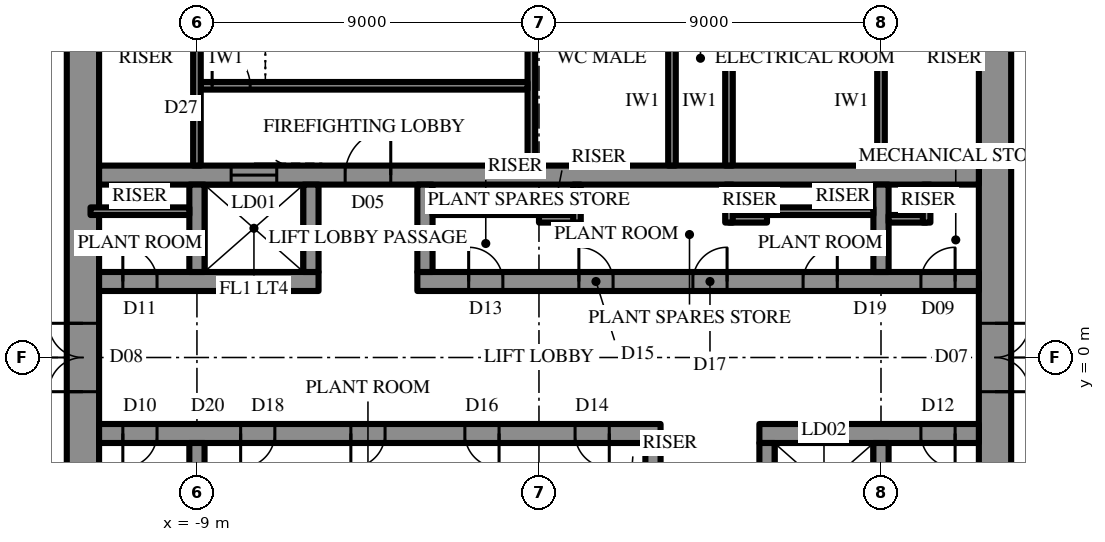
"""IFC4 building model, lengths in metres.
Left out: names, types, materials, properties, quantities, classifications, styles, units other than length and angle.
Written with IfcOpenShell. Run it as: python <this file> out.ifc"""

import sys

from ifc_helpers import new_model, si_unit, direction, frame, frame_2d, origin, place, context, subcontext, project, spatial, rectangle, extrude, element, fill, save


model = new_model("IFC4")
c1 = context("Model", 3, precision=1e-05, world=origin(), true_north=direction((0.0, 1.0)))
c2 = subcontext(c1, "Body", "Model", "MODEL_VIEW")
j1 = project(units=[si_unit("LENGTHUNIT", "METRE"), si_unit("PLANEANGLEUNIT", "RADIAN")], contexts=[c1])
p1 = place(None, origin())
s1 = spatial("IfcSite", under=j1, at=p1, CompositionType="ELEMENT")
p2 = place(p1, origin())
s2 = spatial("IfcBuilding", under=s1, at=p2, CompositionType="ELEMENT")
p3 = place(p2, frame((0.0, 0.0, 402.3)))
s3 = spatial("IfcBuildingStorey", under=s2, at=p3, CompositionType="ELEMENT", Elevation=402.3)
p4 = place(p3, frame((12.0, -10.7, 0.0), z_axis=(0.0, 0.0, 1.0), x_axis=(0.0, 1.0, 0.0)))
e1 = element("IfcWall", 1, at=p4, inside=s3, PredefinedType="SHEAR", context=c2, shape_type="SweptSolid", body=[
    extrude(rectangle(XDim=21.4, YDim=0.85, at=frame_2d((10.7, 0.0))), origin(), (0.0, 0.0, 1.0), 6.0),
])
p5 = place(p4, frame((9.8, 0.0, 0.0)))
e2 = element("IfcOpeningElement", 2, at=p5, cuts=e1, PredefinedType="OPENING", context=c2, shape_type="SweptSolid", body=[
    extrude(rectangle(XDim=1.8, YDim=2.4, at=frame_2d((0.9, 1.2))), frame((0.0, 0.435, 0.0), z_axis=(0.0, -1.0, 0.0), x_axis=(1.0, 0.0, 0.0)), (0.0, 0.0, 1.0), 0.87),
])
p6 = place(p3, frame((-12.0, 10.7, 0.0), z_axis=(0.0, 0.0, 1.0), x_axis=(0.0, -1.0, 0.0)))
e3 = element("IfcWall", 3, at=p6, inside=s3, PredefinedType="SHEAR", context=c2, shape_type="SweptSolid", body=[
    extrude(rectangle(XDim=21.4, YDim=0.85, at=frame_2d((10.7, 0.0))), origin(), (0.0, 0.0, 1.0), 6.0),
])
p7 = place(p6, frame((9.8, 0.0, 0.0)))
e4 = element("IfcOpeningElement", 4, at=p7, cuts=e3, PredefinedType="OPENING", context=c2, shape_type="SweptSolid", body=[
    extrude(rectangle(XDim=1.8, YDim=2.4, at=frame_2d((0.9, 1.2))), frame((0.0, 0.435, 0.0), z_axis=(0.0, -1.0, 0.0), x_axis=(1.0, 0.0, 0.0)), (0.0, 0.0, 1.0), 0.87),
])
p8 = place(p3, frame((-11.575, 2.0, 0.0), z_axis=(0.0, 0.0, 1.0), x_axis=(1.0, 0.0, 0.0)))
e5 = element("IfcWall", 5, at=p8, inside=s3, PredefinedType="SHEAR", context=c2, shape_type="SweptSolid", body=[
    extrude(rectangle(XDim=5.775, YDim=0.5, at=frame_2d((2.887, 0.0))), origin(), (0.0, 0.0, 1.0), 6.0),
])
p9 = place(p8, frame((0.625, 0.0, 0.0)))
e6 = element("IfcOpeningElement", 6, at=p9, cuts=e5, PredefinedType="OPENING", context=c2, shape_type="SweptSolid", body=[
    extrude(rectangle(XDim=0.9, YDim=2.2, at=frame_2d((0.45, 1.1))), frame((0.0, 0.26, 0.0), z_axis=(0.0, -1.0, 0.0), x_axis=(1.0, 0.0, 0.0)), (0.0, 0.0, 1.0), 0.52),
])
p10 = place(p3, frame((-3.2, 2.0, 0.0), z_axis=(0.0, 0.0, 1.0), x_axis=(1.0, 0.0, 0.0)))
e7 = element("IfcWall", 7, at=p10, inside=s3, PredefinedType="SHEAR", context=c2, shape_type="SweptSolid", body=[
    extrude(rectangle(XDim=14.775, YDim=0.5, at=frame_2d((7.387, 0.0))), origin(), (0.0, 0.0, 1.0), 6.0),
])
p11 = place(p10, frame((1.35, 0.0, 0.0)))
e8 = element("IfcOpeningElement", 8, at=p11, cuts=e7, PredefinedType="OPENING", context=c2, shape_type="SweptSolid", body=[
    extrude(rectangle(XDim=0.9, YDim=2.2, at=frame_2d((0.45, 1.1))), frame((0.0, 0.26, 0.0), z_axis=(0.0, -1.0, 0.0), x_axis=(1.0, 0.0, 0.0)), (0.0, 0.0, 1.0), 0.52),
])
p12 = place(p10, frame((4.25, 0.0, 0.0)))
e9 = element("IfcOpeningElement", 9, at=p12, cuts=e7, PredefinedType="OPENING", context=c2, shape_type="SweptSolid", body=[
    extrude(rectangle(XDim=0.9, YDim=2.2, at=frame_2d((0.45, 1.1))), frame((0.0, 0.26, 0.0), z_axis=(0.0, -1.0, 0.0), x_axis=(1.0, 0.0, 0.0)), (0.0, 0.0, 1.0), 0.52),
])
p13 = place(p10, frame((7.25, 0.0, 0.0)))
e10 = element("IfcOpeningElement", 10, at=p13, cuts=e7, PredefinedType="OPENING", context=c2, shape_type="SweptSolid", body=[
    extrude(rectangle(XDim=0.9, YDim=2.2, at=frame_2d((0.45, 1.1))), frame((0.0, 0.26, 0.0), z_axis=(0.0, -1.0, 0.0), x_axis=(1.0, 0.0, 0.0)), (0.0, 0.0, 1.0), 0.52),
])
p14 = place(p10, frame((10.15, 0.0, 0.0)))
e11 = element("IfcOpeningElement", 11, at=p14, cuts=e7, PredefinedType="OPENING", context=c2, shape_type="SweptSolid", body=[
    extrude(rectangle(XDim=0.9, YDim=2.2, at=frame_2d((0.45, 1.1))), frame((0.0, 0.26, 0.0), z_axis=(0.0, -1.0, 0.0), x_axis=(1.0, 0.0, 0.0)), (0.0, 0.0, 1.0), 0.52),
])
p15 = place(p10, frame((13.25, 0.0, 0.0)))
e12 = element("IfcOpeningElement", 12, at=p15, cuts=e7, PredefinedType="OPENING", context=c2, shape_type="SweptSolid", body=[
    extrude(rectangle(XDim=0.9, YDim=2.2, at=frame_2d((0.45, 1.1))), frame((0.0, 0.26, 0.0), z_axis=(0.0, -1.0, 0.0), x_axis=(1.0, 0.0, 0.0)), (0.0, 0.0, 1.0), 0.52),
])
p16 = place(p3, frame((-11.575, 4.8, 0.0), z_axis=(0.0, 0.0, 1.0), x_axis=(1.0, 0.0, 0.0)))
e13 = element("IfcWall", 13, at=p16, inside=s3, PredefinedType="SHEAR", context=c2, shape_type="SweptSolid", body=[
    extrude(rectangle(XDim=23.15, YDim=0.5, at=frame_2d((11.575, 0.0))), origin(), (0.0, 0.0, 1.0), 6.0),
])
p17 = place(p16, frame((6.475, 0.0, 0.0)))
e14 = element("IfcOpeningElement", 14, at=p17, cuts=e13, PredefinedType="OPENING", context=c2, shape_type="SweptSolid", body=[
    extrude(rectangle(XDim=1.2, YDim=2.2, at=frame_2d((0.6, 1.1))), frame((0.0, 0.26, 0.0), z_axis=(0.0, -1.0, 0.0), x_axis=(1.0, 0.0, 0.0)), (0.0, 0.0, 1.0), 0.52),
])
p18 = place(p16, frame((3.475, 0.0, 0.0)))
e15 = element("IfcOpeningElement", 15, at=p18, cuts=e13, PredefinedType="OPENING", context=c2, shape_type="SweptSolid", body=[
    extrude(rectangle(XDim=1.2, YDim=2.2, at=frame_2d((0.6, 1.1))), frame((0.0, 0.26, 0.0), z_axis=(0.0, -1.0, 0.0), x_axis=(1.0, 0.0, 0.0)), (0.0, 0.0, 1.0), 0.52),
])
for number, where, z_axis, x_axis in (
    (16, (-9.0, 2.25, 0.0), (0.0, 0.0, 1.0), (0.0, 1.0, 0.0)),
    (17, (-6.0, 2.25, 0.0), (0.0, 0.0, 1.0), (0.0, 1.0, 0.0)),
    (18, (-3.0, 2.25, 0.0), (0.0, 0.0, 1.0), (0.0, 1.0, 0.0)),
    (19, (9.0, 2.25, 0.0), (0.0, 0.0, 1.0), (0.0, 1.0, 0.0)),
):
    element("IfcWall", number, at=place(p3, frame(where, z_axis=z_axis, x_axis=x_axis)), inside=s3, PredefinedType="SHEAR", context=c2, shape_type="SweptSolid", body=[
        extrude(rectangle(XDim=2.3, YDim=0.4, at=frame_2d((1.15, 0.0))), origin(), (0.0, 0.0, 1.0), 6.0),
    ])
p19 = place(p3, frame((-0.2, 5.05, 0.0), z_axis=(0.0, 0.0, 1.0), x_axis=(0.0, 1.0, 0.0)))
e20 = element("IfcWall", 20, at=p19, inside=s3, PredefinedType="SHEAR", context=c2, shape_type="SweptSolid", body=[
    extrude(rectangle(XDim=5.65, YDim=0.2, at=frame_2d((2.825, 0.0))), origin(), (0.0, 0.0, 1.0), 6.0),
])
p20 = place(p3, frame((-8.9, 7.15, 0.0), z_axis=(0.0, 0.0, 1.0), x_axis=(1.0, 0.0, 0.0)))
e21 = element("IfcWall", 21, at=p20, inside=s3, PredefinedType="SHEAR", context=c2, shape_type="SweptSolid", body=[
    extrude(rectangle(XDim=8.6, YDim=0.2, at=frame_2d((4.3, 0.0))), origin(), (0.0, 0.0, 1.0), 6.0),
])
p21 = place(p20, frame((0.3, 0.0, 0.0)))
e22 = element("IfcOpeningElement", 22, at=p21, cuts=e21, PredefinedType="OPENING", context=c2, shape_type="SweptSolid", body=[
    extrude(rectangle(XDim=1.0, YDim=2.2, at=frame_2d((0.5, 1.1))), frame((0.0, 0.11, 0.0), z_axis=(0.0, -1.0, 0.0), x_axis=(1.0, 0.0, 0.0)), (0.0, 0.0, 1.0), 0.22),
])
p22 = place(p3, frame((11.575, -2.0, 0.0), z_axis=(0.0, 0.0, 1.0), x_axis=(-1.0, 0.0, 0.0)))
e23 = element("IfcWall", 23, at=p22, inside=s3, PredefinedType="SHEAR", context=c2, shape_type="SweptSolid", body=[
    extrude(rectangle(XDim=5.775, YDim=0.5, at=frame_2d((2.887, 0.0))), origin(), (0.0, 0.0, 1.0), 6.0),
])
p23 = place(p22, frame((0.625, 0.0, 0.0)))
e24 = element("IfcOpeningElement", 24, at=p23, cuts=e23, PredefinedType="OPENING", context=c2, shape_type="SweptSolid", body=[
    extrude(rectangle(XDim=0.9, YDim=2.2, at=frame_2d((0.45, 1.1))), frame((0.0, 0.26, 0.0), z_axis=(0.0, -1.0, 0.0), x_axis=(1.0, 0.0, 0.0)), (0.0, 0.0, 1.0), 0.52),
])
p24 = place(p3, frame((3.2, -2.0, 0.0), z_axis=(0.0, 0.0, 1.0), x_axis=(-1.0, 0.0, 0.0)))
e25 = element("IfcWall", 25, at=p24, inside=s3, PredefinedType="SHEAR", context=c2, shape_type="SweptSolid", body=[
    extrude(rectangle(XDim=14.775, YDim=0.5, at=frame_2d((7.387, 0.0))), origin(), (0.0, 0.0, 1.0), 6.0),
])
p25 = place(p24, frame((1.35, 0.0, 0.0)))
e26 = element("IfcOpeningElement", 26, at=p25, cuts=e25, PredefinedType="OPENING", context=c2, shape_type="SweptSolid", body=[
    extrude(rectangle(XDim=0.9, YDim=2.2, at=frame_2d((0.45, 1.1))), frame((0.0, 0.26, 0.0), z_axis=(0.0, -1.0, 0.0), x_axis=(1.0, 0.0, 0.0)), (0.0, 0.0, 1.0), 0.52),
])
p26 = place(p24, frame((4.25, 0.0, 0.0)))
e27 = element("IfcOpeningElement", 27, at=p26, cuts=e25, PredefinedType="OPENING", context=c2, shape_type="SweptSolid", body=[
    extrude(rectangle(XDim=0.9, YDim=2.2, at=frame_2d((0.45, 1.1))), frame((0.0, 0.26, 0.0), z_axis=(0.0, -1.0, 0.0), x_axis=(1.0, 0.0, 0.0)), (0.0, 0.0, 1.0), 0.52),
])
p27 = place(p24, frame((7.25, 0.0, 0.0)))
e28 = element("IfcOpeningElement", 28, at=p27, cuts=e25, PredefinedType="OPENING", context=c2, shape_type="SweptSolid", body=[
    extrude(rectangle(XDim=0.9, YDim=2.2, at=frame_2d((0.45, 1.1))), frame((0.0, 0.26, 0.0), z_axis=(0.0, -1.0, 0.0), x_axis=(1.0, 0.0, 0.0)), (0.0, 0.0, 1.0), 0.52),
])
p28 = place(p24, frame((10.15, 0.0, 0.0)))
e29 = element("IfcOpeningElement", 29, at=p28, cuts=e25, PredefinedType="OPENING", context=c2, shape_type="SweptSolid", body=[
    extrude(rectangle(XDim=0.9, YDim=2.2, at=frame_2d((0.45, 1.1))), frame((0.0, 0.26, 0.0), z_axis=(0.0, -1.0, 0.0), x_axis=(1.0, 0.0, 0.0)), (0.0, 0.0, 1.0), 0.52),
])
p29 = place(p24, frame((13.25, 0.0, 0.0)))
e30 = element("IfcOpeningElement", 30, at=p29, cuts=e25, PredefinedType="OPENING", context=c2, shape_type="SweptSolid", body=[
    extrude(rectangle(XDim=0.9, YDim=2.2, at=frame_2d((0.45, 1.1))), frame((0.0, 0.26, 0.0), z_axis=(0.0, -1.0, 0.0), x_axis=(1.0, 0.0, 0.0)), (0.0, 0.0, 1.0), 0.52),
])
for number, where, z_axis, x_axis in (
    (31, (9.0, -2.25, 0.0), (0.0, 0.0, 1.0), (0.0, -1.0, 0.0)),
    (32, (6.0, -2.25, 0.0), (0.0, 0.0, 1.0), (0.0, -1.0, 0.0)),
    (33, (3.0, -2.25, 0.0), (0.0, 0.0, 1.0), (0.0, -1.0, 0.0)),
    (34, (-9.0, -2.25, 0.0), (0.0, 0.0, 1.0), (0.0, -1.0, 0.0)),
):
    element("IfcWall", number, at=place(p3, frame(where, z_axis=z_axis, x_axis=x_axis)), inside=s3, PredefinedType="SHEAR", context=c2, shape_type="SweptSolid", body=[
        extrude(rectangle(XDim=2.3, YDim=0.4, at=frame_2d((1.15, 0.0))), origin(), (0.0, 0.0, 1.0), 6.0),
    ])
for number, where, z_axis, x_axis in (
    (35, (-9.0, 5.05, 0.0), (0.0, 0.0, 1.0), (0.0, 1.0, 0.0)),
    (36, (9.0, 5.05, 0.0), (0.0, 0.0, 1.0), (0.0, 1.0, 0.0)),
    (37, (3.5, 5.05, 0.0), (0.0, 0.0, 1.0), (0.0, 1.0, 0.0)),
    (38, (5.0, 5.05, 0.0), (0.0, 0.0, 1.0), (0.0, 1.0, 0.0)),
):
    element("IfcWall", number, at=place(p3, frame(where, z_axis=z_axis, x_axis=x_axis)), inside=s3, PredefinedType="PARTITIONING", context=c2, shape_type="SweptSolid", body=[
        extrude(rectangle(XDim=5.65, YDim=0.2, at=frame_2d((2.825, 0.0))), origin(), (0.0, 0.0, 1.0), 5.7),
    ])
p30 = place(p3, frame((-11.8, 3.85, 0.0), z_axis=(0.0, 0.0, 1.0), x_axis=(1.0, 0.0, 0.0)))
e39 = element("IfcWall", 39, at=p30, inside=s3, PredefinedType="PARTITIONING", context=c2, shape_type="SweptSolid", body=[
    extrude(rectangle(XDim=2.6, YDim=0.2, at=frame_2d((1.3, 0.0))), origin(), (0.0, 0.0, 1.0), 5.7),
])
p31 = place(p3, frame((-2.8, 3.85, 0.0), z_axis=(0.0, 0.0, 1.0), x_axis=(1.0, 0.0, 0.0)))
e40 = element("IfcWall", 40, at=p31, inside=s3, PredefinedType="PARTITIONING", context=c2, shape_type="SweptSolid", body=[
    extrude(rectangle(XDim=2.8, YDim=0.2, at=frame_2d((1.4, 0.0))), origin(), (0.0, 0.0, 1.0), 5.7),
])
for number, where, z_axis, x_axis in (
    (41, (0.0, 3.65, 0.0), (0.0, 0.0, 1.0), (1.0, 0.0, 0.0)),
    (42, (1.0, 3.55, 0.0), (0.0, 0.0, 1.0), (0.0, 1.0, 0.0)),
    (43, (5.0, 3.65, 0.0), (0.0, 0.0, 1.0), (1.0, 0.0, 0.0)),
    (44, (5.0, 3.55, 0.0), (0.0, 0.0, 1.0), (0.0, 1.0, 0.0)),
):
    element("IfcWall", number, at=place(p3, frame(where, z_axis=z_axis, x_axis=x_axis)), inside=s3, PredefinedType="PARTITIONING", context=c2, shape_type="SweptSolid", body=[
        extrude(rectangle(XDim=1.0, YDim=0.2, at=frame_2d((0.5, 0.0))), origin(), (0.0, 0.0, 1.0), 5.7),
    ])
p32 = place(p3, frame((6.0, 3.85, 0.0), z_axis=(0.0, 0.0, 1.0), x_axis=(1.0, 0.0, 0.0)))
e45 = element("IfcWall", 45, at=p32, inside=s3, PredefinedType="PARTITIONING", context=c2, shape_type="SweptSolid", body=[
    extrude(rectangle(XDim=2.8, YDim=0.2, at=frame_2d((1.4, 0.0))), origin(), (0.0, 0.0, 1.0), 5.7),
])
for number, where, z_axis, x_axis in (
    (46, (9.2, 3.65, 0.0), (0.0, 0.0, 1.0), (1.0, 0.0, 0.0)),
    (47, (10.2, 3.55, 0.0), (0.0, 0.0, 1.0), (0.0, 1.0, 0.0)),
):
    element("IfcWall", number, at=place(p3, frame(where, z_axis=z_axis, x_axis=x_axis)), inside=s3, PredefinedType="PARTITIONING", context=c2, shape_type="SweptSolid", body=[
        extrude(rectangle(XDim=1.0, YDim=0.2, at=frame_2d((0.5, 0.0))), origin(), (0.0, 0.0, 1.0), 5.7),
    ])
p33 = place(p5, frame((1.8, 0.0, 0.0), z_axis=(0.0, 0.0, 1.0), x_axis=(-1.0, 0.0, 0.0)))
e48 = element("IfcDoor", 48, at=p33, inside=s3, OperationType="DOUBLE_DOOR_SINGLE_SWING", PredefinedType="DOOR", context=c2, shape_type="SweptSolid", body=[
    extrude(rectangle(XDim=1.8, YDim=2.4, at=frame_2d((0.9, 1.2))), frame((0.0, 0.025, 0.0), z_axis=(0.0, -1.0, 0.0), x_axis=(1.0, 0.0, 0.0)), (0.0, 0.0, 1.0), 0.05),
])
fill(e2, e48)
p34 = place(p7, frame((1.8, 0.0, 0.0), z_axis=(0.0, 0.0, 1.0), x_axis=(-1.0, 0.0, 0.0)))
e49 = element("IfcDoor", 49, at=p34, inside=s3, OperationType="DOUBLE_DOOR_SINGLE_SWING", PredefinedType="DOOR", context=c2, shape_type="SweptSolid", body=[
    extrude(rectangle(XDim=1.8, YDim=2.4, at=frame_2d((0.9, 1.2))), frame((0.0, 0.025, 0.0), z_axis=(0.0, -1.0, 0.0), x_axis=(1.0, 0.0, 0.0)), (0.0, 0.0, 1.0), 0.05),
])
fill(e4, e49)
p35 = place(p17, origin())
e50 = element("IfcDoor", 50, at=p35, inside=s3, OperationType="SINGLE_SWING_LEFT", PredefinedType="DOOR", context=c2, shape_type="SweptSolid", body=[
    extrude(rectangle(XDim=1.2, YDim=2.2, at=frame_2d((0.6, 1.1))), frame((0.0, 0.025, 0.0), z_axis=(0.0, -1.0, 0.0), x_axis=(1.0, 0.0, 0.0)), (0.0, 0.0, 1.0), 0.05),
])
fill(e14, e50)
p36 = place(p21, origin())
e51 = element("IfcDoor", 51, at=p36, inside=s3, OperationType="SINGLE_SWING_RIGHT", PredefinedType="DOOR", context=c2, shape_type="SweptSolid", body=[
    extrude(rectangle(XDim=1.0, YDim=2.2, at=frame_2d((0.5, 1.1))), frame((0.0, 0.025, 0.0), z_axis=(0.0, -1.0, 0.0), x_axis=(1.0, 0.0, 0.0)), (0.0, 0.0, 1.0), 0.05),
])
fill(e22, e51)
p37 = place(p9, origin())
e52 = element("IfcDoor", 52, at=p37, inside=s3, OperationType="SINGLE_SWING_RIGHT", PredefinedType="DOOR", context=c2, shape_type="SweptSolid", body=[
    extrude(rectangle(XDim=0.9, YDim=2.2, at=frame_2d((0.45, 1.1))), frame((0.0, 0.025, 0.0), z_axis=(0.0, -1.0, 0.0), x_axis=(1.0, 0.0, 0.0)), (0.0, 0.0, 1.0), 0.05),
])
fill(e6, e52)
p38 = place(p11, origin())
e53 = element("IfcDoor", 53, at=p38, inside=s3, OperationType="SINGLE_SWING_RIGHT", PredefinedType="DOOR", context=c2, shape_type="SweptSolid", body=[
    extrude(rectangle(XDim=0.9, YDim=2.2, at=frame_2d((0.45, 1.1))), frame((0.0, 0.025, 0.0), z_axis=(0.0, -1.0, 0.0), x_axis=(1.0, 0.0, 0.0)), (0.0, 0.0, 1.0), 0.05),
])
fill(e8, e53)
p39 = place(p12, origin())
e54 = element("IfcDoor", 54, at=p39, inside=s3, OperationType="SINGLE_SWING_RIGHT", PredefinedType="DOOR", context=c2, shape_type="SweptSolid", body=[
    extrude(rectangle(XDim=0.9, YDim=2.2, at=frame_2d((0.45, 1.1))), frame((0.0, 0.025, 0.0), z_axis=(0.0, -1.0, 0.0), x_axis=(1.0, 0.0, 0.0)), (0.0, 0.0, 1.0), 0.05),
])
fill(e9, e54)
p40 = place(p13, origin())
e55 = element("IfcDoor", 55, at=p40, inside=s3, OperationType="SINGLE_SWING_LEFT", PredefinedType="DOOR", context=c2, shape_type="SweptSolid", body=[
    extrude(rectangle(XDim=0.9, YDim=2.2, at=frame_2d((0.45, 1.1))), frame((0.0, 0.025, 0.0), z_axis=(0.0, -1.0, 0.0), x_axis=(1.0, 0.0, 0.0)), (0.0, 0.0, 1.0), 0.05),
])
fill(e10, e55)
p41 = place(p14, origin())
e56 = element("IfcDoor", 56, at=p41, inside=s3, OperationType="SINGLE_SWING_LEFT", PredefinedType="DOOR", context=c2, shape_type="SweptSolid", body=[
    extrude(rectangle(XDim=0.9, YDim=2.2, at=frame_2d((0.45, 1.1))), frame((0.0, 0.025, 0.0), z_axis=(0.0, -1.0, 0.0), x_axis=(1.0, 0.0, 0.0)), (0.0, 0.0, 1.0), 0.05),
])
fill(e11, e56)
p42 = place(p15, origin())
e57 = element("IfcDoor", 57, at=p42, inside=s3, OperationType="SINGLE_SWING_LEFT", PredefinedType="DOOR", context=c2, shape_type="SweptSolid", body=[
    extrude(rectangle(XDim=0.9, YDim=2.2, at=frame_2d((0.45, 1.1))), frame((0.0, 0.025, 0.0), z_axis=(0.0, -1.0, 0.0), x_axis=(1.0, 0.0, 0.0)), (0.0, 0.0, 1.0), 0.05),
])
fill(e12, e57)
p43 = place(p23, origin())
e58 = element("IfcDoor", 58, at=p43, inside=s3, OperationType="SINGLE_SWING_RIGHT", PredefinedType="DOOR", context=c2, shape_type="SweptSolid", body=[
    extrude(rectangle(XDim=0.9, YDim=2.2, at=frame_2d((0.45, 1.1))), frame((0.0, 0.025, 0.0), z_axis=(0.0, -1.0, 0.0), x_axis=(1.0, 0.0, 0.0)), (0.0, 0.0, 1.0), 0.05),
])
fill(e24, e58)
p44 = place(p25, origin())
e59 = element("IfcDoor", 59, at=p44, inside=s3, OperationType="SINGLE_SWING_RIGHT", PredefinedType="DOOR", context=c2, shape_type="SweptSolid", body=[
    extrude(rectangle(XDim=0.9, YDim=2.2, at=frame_2d((0.45, 1.1))), frame((0.0, 0.025, 0.0), z_axis=(0.0, -1.0, 0.0), x_axis=(1.0, 0.0, 0.0)), (0.0, 0.0, 1.0), 0.05),
])
fill(e26, e59)
p45 = place(p26, origin())
e60 = element("IfcDoor", 60, at=p45, inside=s3, OperationType="SINGLE_SWING_RIGHT", PredefinedType="DOOR", context=c2, shape_type="SweptSolid", body=[
    extrude(rectangle(XDim=0.9, YDim=2.2, at=frame_2d((0.45, 1.1))), frame((0.0, 0.025, 0.0), z_axis=(0.0, -1.0, 0.0), x_axis=(1.0, 0.0, 0.0)), (0.0, 0.0, 1.0), 0.05),
])
fill(e27, e60)
p46 = place(p27, origin())
e61 = element("IfcDoor", 61, at=p46, inside=s3, OperationType="SINGLE_SWING_LEFT", PredefinedType="DOOR", context=c2, shape_type="SweptSolid", body=[
    extrude(rectangle(XDim=0.9, YDim=2.2, at=frame_2d((0.45, 1.1))), frame((0.0, 0.025, 0.0), z_axis=(0.0, -1.0, 0.0), x_axis=(1.0, 0.0, 0.0)), (0.0, 0.0, 1.0), 0.05),
])
fill(e28, e61)
p47 = place(p28, origin())
e62 = element("IfcDoor", 62, at=p47, inside=s3, OperationType="SINGLE_SWING_LEFT", PredefinedType="DOOR", context=c2, shape_type="SweptSolid", body=[
    extrude(rectangle(XDim=0.9, YDim=2.2, at=frame_2d((0.45, 1.1))), frame((0.0, 0.025, 0.0), z_axis=(0.0, -1.0, 0.0), x_axis=(1.0, 0.0, 0.0)), (0.0, 0.0, 1.0), 0.05),
])
fill(e29, e62)
p48 = place(p29, origin())
e63 = element("IfcDoor", 63, at=p48, inside=s3, OperationType="SINGLE_SWING_LEFT", PredefinedType="DOOR", context=c2, shape_type="SweptSolid", body=[
    extrude(rectangle(XDim=0.9, YDim=2.2, at=frame_2d((0.45, 1.1))), frame((0.0, 0.025, 0.0), z_axis=(0.0, -1.0, 0.0), x_axis=(1.0, 0.0, 0.0)), (0.0, 0.0, 1.0), 0.05),
])
fill(e30, e63)
p49 = place(p18, origin())
e64 = element("IfcDoor", 64, at=p49, inside=s3, OperationType="SLIDING_TO_LEFT", PredefinedType="DOOR", context=c2, shape_type="SweptSolid", body=[
    extrude(rectangle(XDim=1.2, YDim=2.2, at=frame_2d((0.6, 1.1))), frame((0.0, 0.025, 0.0), z_axis=(0.0, -1.0, 0.0), x_axis=(1.0, 0.0, 0.0)), (0.0, 0.0, 1.0), 0.05),
])
fill(e15, e64)
save(model, sys.argv[1])
